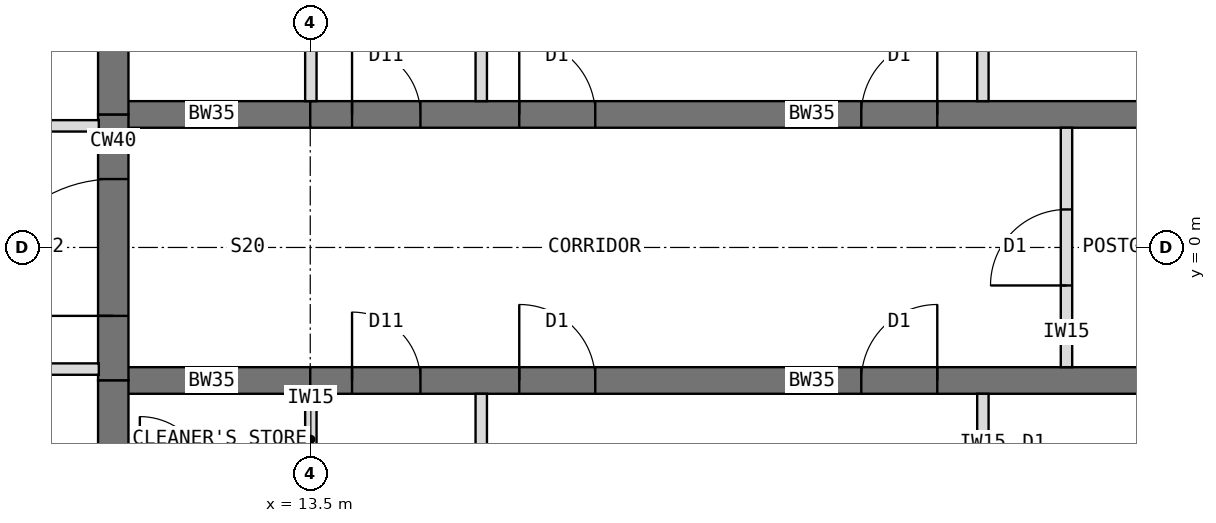
"""IFC4 building model, lengths in metres.
Left out: names, types, materials, properties, quantities, classifications, styles, units other than length and angle.
Written with IfcOpenShell. Run it as: python <this file> out.ifc"""

import sys

from ifc_helpers import new_model, si_unit, direction, frame, frame_2d, origin, place, context, subcontext, project, spatial, rectangle, extrude, element, fill, save


model = new_model("IFC4")
c1 = context("Model", 3, precision=1e-05, world=origin(), true_north=direction((0.0, 1.0)))
c2 = subcontext(c1, "Body", "Model", "MODEL_VIEW")
j1 = project(units=[si_unit("LENGTHUNIT", "METRE"), si_unit("PLANEANGLEUNIT", "RADIAN")], contexts=[c1])
p1 = place(None, origin())
s1 = spatial("IfcSite", under=j1, at=p1, CompositionType="ELEMENT")
p2 = place(p1, origin())
s2 = spatial("IfcBuilding", under=s1, at=p2, CompositionType="ELEMENT")
p3 = place(p2, frame((0.0, 0.0, 251.5)))
s3 = spatial("IfcBuildingStorey", under=s2, at=p3, CompositionType="ELEMENT", Elevation=251.5)
p4 = place(p3, frame((10.908, -6.298, 0.0), z_axis=(0.0, 0.0, 1.0), x_axis=(0.0, 1.0, 0.0)))
e1 = element("IfcWall", 1, at=p4, inside=s3, PredefinedType="SHEAR", context=c2, shape_type="SweptSolid", body=[
    extrude(rectangle(XDim=4.548, YDim=0.4, at=frame_2d((2.274, 0.0))), origin(), (0.0, 0.0, 1.0), 4.0),
])
p5 = place(p3, frame((10.908, -1.75, 0.0), z_axis=(0.0, 0.0, 1.0), x_axis=(0.0, 1.0, 0.0)))
e2 = element("IfcWall", 2, at=p5, inside=s3, PredefinedType="SHEAR", context=c2, shape_type="SweptSolid", body=[
    extrude(rectangle(XDim=3.5, YDim=0.4, at=frame_2d((1.75, 0.0))), origin(), (0.0, 0.0, 1.0), 4.0),
])
p6 = place(p5, frame((0.85, 0.0, 0.0)))
e3 = element("IfcOpeningElement", 3, at=p6, cuts=e2, PredefinedType="OPENING", context=c2, shape_type="SweptSolid", body=[
    extrude(rectangle(XDim=1.8, YDim=2.1, at=frame_2d((0.9, 1.05))), frame((0.0, 0.21, 0.0), z_axis=(0.0, -1.0, 0.0), x_axis=(1.0, 0.0, 0.0)), (0.0, 0.0, 1.0), 0.42),
])
p7 = place(p3, frame((10.908, 1.75, 0.0), z_axis=(0.0, 0.0, 1.0), x_axis=(0.0, 1.0, 0.0)))
e4 = element("IfcWall", 4, at=p7, inside=s3, PredefinedType="SHEAR", context=c2, shape_type="SweptSolid", body=[
    extrude(rectangle(XDim=4.548, YDim=0.4, at=frame_2d((2.274, 0.0))), origin(), (0.0, 0.0, 1.0), 4.0),
])
p8 = place(p3, frame((10.908, 1.75, 0.0), z_axis=(0.0, 0.0, 1.0), x_axis=(1.0, 0.0, 0.0)))
e5 = element("IfcWall", 5, at=p8, inside=s3, PredefinedType="SHEAR", context=c2, shape_type="SweptSolid", body=[
    extrude(rectangle(XDim=2.592, YDim=0.35, at=frame_2d((1.296, 0.0))), origin(), (0.0, 0.0, 1.0), 4.0),
])
p9 = place(p3, frame((13.5, 1.75, 0.0), z_axis=(0.0, 0.0, 1.0), x_axis=(1.0, 0.0, 0.0)))
e6 = element("IfcWall", 6, at=p9, inside=s3, PredefinedType="SHEAR", context=c2, shape_type="SweptSolid", body=[
    extrude(rectangle(XDim=13.2, YDim=0.35, at=frame_2d((6.6, 0.0))), origin(), (0.0, 0.0, 1.0), 4.0),
])
p10 = place(p9, frame((0.55, 0.0, 0.0)))
e7 = element("IfcOpeningElement", 7, at=p10, cuts=e6, PredefinedType="OPENING", context=c2, shape_type="SweptSolid", body=[
    extrude(rectangle(XDim=0.9, YDim=2.1, at=frame_2d((0.45, 1.05))), frame((0.0, 0.185, 0.0), z_axis=(0.0, -1.0, 0.0), x_axis=(1.0, 0.0, 0.0)), (0.0, 0.0, 1.0), 0.37),
])
p11 = place(p9, frame((2.75, 0.0, 0.0)))
e8 = element("IfcOpeningElement", 8, at=p11, cuts=e6, PredefinedType="OPENING", context=c2, shape_type="SweptSolid", body=[
    extrude(rectangle(XDim=1.0, YDim=2.1, at=frame_2d((0.5, 1.05))), frame((0.0, 0.185, 0.0), z_axis=(0.0, -1.0, 0.0), x_axis=(1.0, 0.0, 0.0)), (0.0, 0.0, 1.0), 0.37),
])
p12 = place(p9, frame((7.25, 0.0, 0.0)))
e9 = element("IfcOpeningElement", 9, at=p12, cuts=e6, PredefinedType="OPENING", context=c2, shape_type="SweptSolid", body=[
    extrude(rectangle(XDim=1.0, YDim=2.1, at=frame_2d((0.5, 1.05))), frame((0.0, 0.185, 0.0), z_axis=(0.0, -1.0, 0.0), x_axis=(1.0, 0.0, 0.0)), (0.0, 0.0, 1.0), 0.37),
])
p13 = place(p3, frame((10.908, -1.75, 0.0), z_axis=(0.0, 0.0, 1.0), x_axis=(1.0, 0.0, 0.0)))
e10 = element("IfcWall", 10, at=p13, inside=s3, PredefinedType="SHEAR", context=c2, shape_type="SweptSolid", body=[
    extrude(rectangle(XDim=2.592, YDim=0.35, at=frame_2d((1.296, 0.0))), origin(), (0.0, 0.0, 1.0), 4.0),
])
p14 = place(p3, frame((13.5, -1.75, 0.0), z_axis=(0.0, 0.0, 1.0), x_axis=(1.0, 0.0, 0.0)))
e11 = element("IfcWall", 11, at=p14, inside=s3, PredefinedType="SHEAR", context=c2, shape_type="SweptSolid", body=[
    extrude(rectangle(XDim=13.2, YDim=0.35, at=frame_2d((6.6, 0.0))), origin(), (0.0, 0.0, 1.0), 4.0),
])
p15 = place(p14, frame((0.55, 0.0, 0.0)))
e12 = element("IfcOpeningElement", 12, at=p15, cuts=e11, PredefinedType="OPENING", context=c2, shape_type="SweptSolid", body=[
    extrude(rectangle(XDim=0.9, YDim=2.1, at=frame_2d((0.45, 1.05))), frame((0.0, 0.185, 0.0), z_axis=(0.0, -1.0, 0.0), x_axis=(1.0, 0.0, 0.0)), (0.0, 0.0, 1.0), 0.37),
])
p16 = place(p14, frame((2.75, 0.0, 0.0)))
e13 = element("IfcOpeningElement", 13, at=p16, cuts=e11, PredefinedType="OPENING", context=c2, shape_type="SweptSolid", body=[
    extrude(rectangle(XDim=1.0, YDim=2.1, at=frame_2d((0.5, 1.05))), frame((0.0, 0.185, 0.0), z_axis=(0.0, -1.0, 0.0), x_axis=(1.0, 0.0, 0.0)), (0.0, 0.0, 1.0), 0.37),
])
p17 = place(p14, frame((7.25, 0.0, 0.0)))
e14 = element("IfcOpeningElement", 14, at=p17, cuts=e11, PredefinedType="OPENING", context=c2, shape_type="SweptSolid", body=[
    extrude(rectangle(XDim=1.0, YDim=2.1, at=frame_2d((0.5, 1.05))), frame((0.0, 0.185, 0.0), z_axis=(0.0, -1.0, 0.0), x_axis=(1.0, 0.0, 0.0)), (0.0, 0.0, 1.0), 0.37),
])
p18 = place(p3, frame((15.75, 1.925, 0.0), z_axis=(0.0, 0.0, 1.0), x_axis=(0.0, 1.0, 0.0)))
e15 = element("IfcWall", 15, at=p18, inside=s3, PredefinedType="PARTITIONING", context=c2, shape_type="SweptSolid", body=[
    extrude(rectangle(XDim=4.825, YDim=0.15, at=frame_2d((2.413, 0.0))), origin(), (0.0, 0.0, 1.0), 3.8),
])
p19 = place(p3, frame((22.35, 1.925, 0.0), z_axis=(0.0, 0.0, 1.0), x_axis=(0.0, 1.0, 0.0)))
e16 = element("IfcWall", 16, at=p19, inside=s3, PredefinedType="PARTITIONING", context=c2, shape_type="SweptSolid", body=[
    extrude(rectangle(XDim=2.4, YDim=0.15, at=frame_2d((1.2, 0.0))), origin(), (0.0, 0.0, 1.0), 3.8),
])
p20 = place(p19, frame((0.7, 0.0, 0.0)))
e17 = element("IfcOpeningElement", 17, at=p20, cuts=e16, PredefinedType="OPENING", context=c2, shape_type="SweptSolid", body=[
    extrude(rectangle(XDim=1.0, YDim=2.1, at=frame_2d((0.5, 1.05))), frame((0.0, 0.085, 0.0), z_axis=(0.0, -1.0, 0.0), x_axis=(1.0, 0.0, 0.0)), (0.0, 0.0, 1.0), 0.17),
])
p21 = place(p3, frame((13.508, 1.925, 0.0), z_axis=(0.0, 0.0, 1.0), x_axis=(0.0, 1.0, 0.0)))
e18 = element("IfcWall", 18, at=p21, inside=s3, PredefinedType="PARTITIONING", context=c2, shape_type="SweptSolid", body=[
    extrude(rectangle(XDim=3.2, YDim=0.15, at=frame_2d((1.6, 0.0))), origin(), (0.0, 0.0, 1.0), 3.267),
])
p22 = place(p3, frame((15.75, -1.925, 0.0), z_axis=(0.0, 0.0, 1.0), x_axis=(0.0, -1.0, 0.0)))
e19 = element("IfcWall", 19, at=p22, inside=s3, PredefinedType="PARTITIONING", context=c2, shape_type="SweptSolid", body=[
    extrude(rectangle(XDim=4.825, YDim=0.15, at=frame_2d((2.413, 0.0))), origin(), (0.0, 0.0, 1.0), 3.8),
])
p23 = place(p3, frame((22.35, -1.925, 0.0), z_axis=(0.0, 0.0, 1.0), x_axis=(0.0, -1.0, 0.0)))
e20 = element("IfcWall", 20, at=p23, inside=s3, PredefinedType="PARTITIONING", context=c2, shape_type="SweptSolid", body=[
    extrude(rectangle(XDim=2.4, YDim=0.15, at=frame_2d((1.2, 0.0))), origin(), (0.0, 0.0, 1.0), 3.8),
])
p24 = place(p23, frame((0.7, 0.0, 0.0)))
e21 = element("IfcOpeningElement", 21, at=p24, cuts=e20, PredefinedType="OPENING", context=c2, shape_type="SweptSolid", body=[
    extrude(rectangle(XDim=1.0, YDim=2.1, at=frame_2d((0.5, 1.05))), frame((0.0, 0.085, 0.0), z_axis=(0.0, -1.0, 0.0), x_axis=(1.0, 0.0, 0.0)), (0.0, 0.0, 1.0), 0.17),
])
p25 = place(p3, frame((13.508, -1.925, 0.0), z_axis=(0.0, 0.0, 1.0), x_axis=(0.0, -1.0, 0.0)))
e22 = element("IfcWall", 22, at=p25, inside=s3, PredefinedType="PARTITIONING", context=c2, shape_type="SweptSolid", body=[
    extrude(rectangle(XDim=1.2, YDim=0.15, at=frame_2d((0.6, 0.0))), origin(), (0.0, 0.0, 1.0), 3.267),
])
p26 = place(p3, frame((6.1, 1.6, 0.0), z_axis=(0.0, 0.0, 1.0), x_axis=(1.0, 0.0, 0.0)))
e23 = element("IfcWall", 23, at=p26, inside=s3, PredefinedType="PARTITIONING", context=c2, shape_type="SweptSolid", body=[
    extrude(rectangle(XDim=4.618, YDim=0.15, at=frame_2d((2.309, 0.0))), origin(), (0.0, 0.0, 1.0), 3.8),
])
p27 = place(p26, frame((1.819, 0.0, 0.0)))
e24 = element("IfcOpeningElement", 24, at=p27, cuts=e23, PredefinedType="OPENING", context=c2, shape_type="SweptSolid", body=[
    extrude(rectangle(XDim=1.0, YDim=2.1, at=frame_2d((0.5, 1.05))), frame((0.0, 0.085, 0.0), z_axis=(0.0, -1.0, 0.0), x_axis=(1.0, 0.0, 0.0)), (0.0, 0.0, 1.0), 0.17),
])
p28 = place(p3, frame((10.718, -1.6, 0.0), z_axis=(0.0, 0.0, 1.0), x_axis=(-1.0, 0.0, 0.0)))
e25 = element("IfcWall", 25, at=p28, inside=s3, PredefinedType="PARTITIONING", context=c2, shape_type="SweptSolid", body=[
    extrude(rectangle(XDim=4.618, YDim=0.15, at=frame_2d((2.309, 0.0))), origin(), (0.0, 0.0, 1.0), 3.8),
])
p29 = place(p28, frame((1.799, 0.0, 0.0)))
e26 = element("IfcOpeningElement", 26, at=p29, cuts=e25, PredefinedType="OPENING", context=c2, shape_type="SweptSolid", body=[
    extrude(rectangle(XDim=1.0, YDim=2.1, at=frame_2d((0.5, 1.05))), frame((0.0, 0.085, 0.0), z_axis=(0.0, -1.0, 0.0), x_axis=(1.0, 0.0, 0.0)), (0.0, 0.0, 1.0), 0.17),
])
p30 = place(p3, frame((23.45, -1.575, 0.0), z_axis=(0.0, 0.0, 1.0), x_axis=(0.0, 1.0, 0.0)))
e27 = element("IfcWall", 27, at=p30, inside=s3, PredefinedType="PARTITIONING", context=c2, shape_type="SweptSolid", body=[
    extrude(rectangle(XDim=3.15, YDim=0.15, at=frame_2d((1.575, 0.0))), origin(), (0.0, 0.0, 1.0), 3.8),
])
p31 = place(p30, frame((1.075, 0.0, 0.0)))
e28 = element("IfcOpeningElement", 28, at=p31, cuts=e27, PredefinedType="OPENING", context=c2, shape_type="SweptSolid", body=[
    extrude(rectangle(XDim=1.0, YDim=2.1, at=frame_2d((0.5, 1.05))), frame((0.0, 0.085, 0.0), z_axis=(0.0, -1.0, 0.0), x_axis=(1.0, 0.0, 0.0)), (0.0, 0.0, 1.0), 0.17),
])
p32 = place(p6, origin())
e29 = element("IfcDoor", 29, at=p32, inside=s3, OperationType="DOUBLE_DOOR_DOUBLE_SWING", PredefinedType="DOOR", context=c2, shape_type="SweptSolid", body=[
    extrude(rectangle(XDim=1.8, YDim=2.1, at=frame_2d((0.9, 1.05))), frame((0.0, 0.025, 0.0), z_axis=(0.0, -1.0, 0.0), x_axis=(1.0, 0.0, 0.0)), (0.0, 0.0, 1.0), 0.05),
])
fill(e3, e29)
p33 = place(p31, origin())
e30 = element("IfcDoor", 30, at=p33, inside=s3, OperationType="SINGLE_SWING_LEFT", PredefinedType="DOOR", context=c2, shape_type="SweptSolid", body=[
    extrude(rectangle(XDim=1.0, YDim=2.1, at=frame_2d((0.5, 1.05))), frame((0.0, 0.025, 0.0), z_axis=(0.0, -1.0, 0.0), x_axis=(1.0, 0.0, 0.0)), (0.0, 0.0, 1.0), 0.05),
])
fill(e28, e30)
p34 = place(p10, origin())
e31 = element("IfcDoor", 31, at=p34, inside=s3, OperationType="SINGLE_SWING_LEFT", PredefinedType="DOOR", context=c2, shape_type="SweptSolid", body=[
    extrude(rectangle(XDim=0.9, YDim=2.1, at=frame_2d((0.45, 1.05))), frame((0.0, 0.025, 0.0), z_axis=(0.0, -1.0, 0.0), x_axis=(1.0, 0.0, 0.0)), (0.0, 0.0, 1.0), 0.05),
])
fill(e7, e31)
p35 = place(p11, origin())
e32 = element("IfcDoor", 32, at=p35, inside=s3, OperationType="SINGLE_SWING_LEFT", PredefinedType="DOOR", context=c2, shape_type="SweptSolid", body=[
    extrude(rectangle(XDim=1.0, YDim=2.1, at=frame_2d((0.5, 1.05))), frame((0.0, 0.025, 0.0), z_axis=(0.0, -1.0, 0.0), x_axis=(1.0, 0.0, 0.0)), (0.0, 0.0, 1.0), 0.05),
])
fill(e8, e32)
p36 = place(p12, origin())
e33 = element("IfcDoor", 33, at=p36, inside=s3, OperationType="SINGLE_SWING_RIGHT", PredefinedType="DOOR", context=c2, shape_type="SweptSolid", body=[
    extrude(rectangle(XDim=1.0, YDim=2.1, at=frame_2d((0.5, 1.05))), frame((0.0, 0.025, 0.0), z_axis=(0.0, -1.0, 0.0), x_axis=(1.0, 0.0, 0.0)), (0.0, 0.0, 1.0), 0.05),
])
fill(e9, e33)
p37 = place(p15, origin())
e34 = element("IfcDoor", 34, at=p37, inside=s3, OperationType="SINGLE_SWING_LEFT", PredefinedType="DOOR", context=c2, shape_type="SweptSolid", body=[
    extrude(rectangle(XDim=0.9, YDim=2.1, at=frame_2d((0.45, 1.05))), frame((0.0, 0.025, 0.0), z_axis=(0.0, -1.0, 0.0), x_axis=(1.0, 0.0, 0.0)), (0.0, 0.0, 1.0), 0.05),
])
fill(e12, e34)
p38 = place(p16, origin())
e35 = element("IfcDoor", 35, at=p38, inside=s3, OperationType="SINGLE_SWING_LEFT", PredefinedType="DOOR", context=c2, shape_type="SweptSolid", body=[
    extrude(rectangle(XDim=1.0, YDim=2.1, at=frame_2d((0.5, 1.05))), frame((0.0, 0.025, 0.0), z_axis=(0.0, -1.0, 0.0), x_axis=(1.0, 0.0, 0.0)), (0.0, 0.0, 1.0), 0.05),
])
fill(e13, e35)
p39 = place(p17, origin())
e36 = element("IfcDoor", 36, at=p39, inside=s3, OperationType="SINGLE_SWING_RIGHT", PredefinedType="DOOR", context=c2, shape_type="SweptSolid", body=[
    extrude(rectangle(XDim=1.0, YDim=2.1, at=frame_2d((0.5, 1.05))), frame((0.0, 0.025, 0.0), z_axis=(0.0, -1.0, 0.0), x_axis=(1.0, 0.0, 0.0)), (0.0, 0.0, 1.0), 0.05),
])
fill(e14, e36)
save(model, sys.argv[1])
